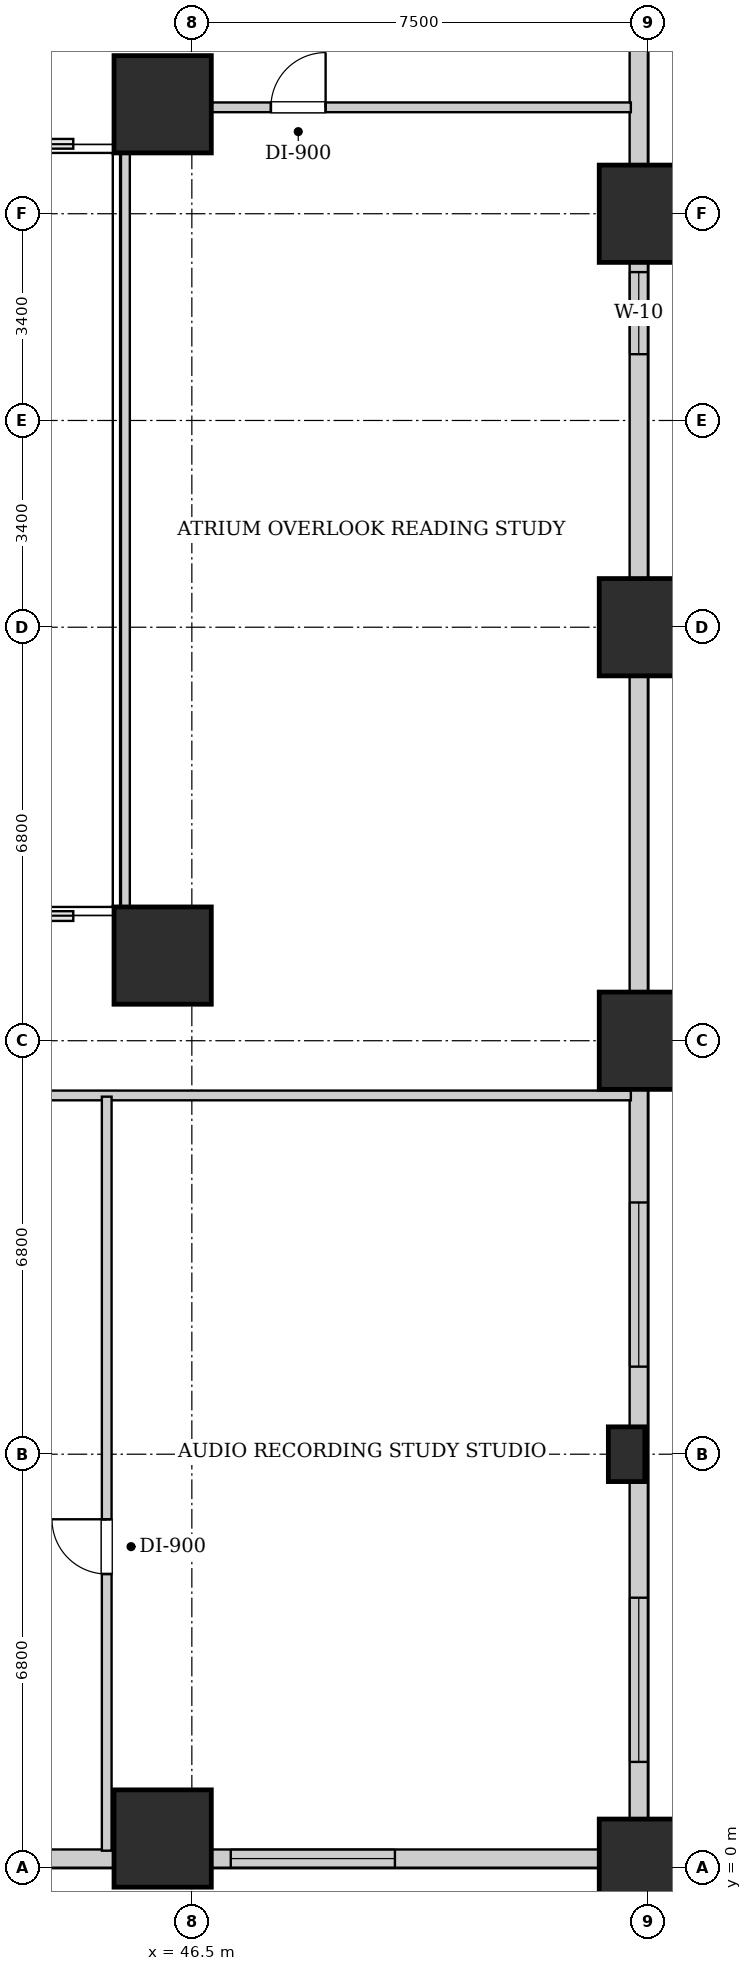
"""IFC4 building model, lengths in metres.
Left out: names, types, materials, properties, quantities, classifications, styles, units other than length and angle.
Written with IfcOpenShell. Run it as: python <this file> out.ifc"""

import sys

from ifc_helpers import new_model, si_unit, direction, frame, frame_2d, origin, origin_2d, place, context, subcontext, project, spatial, rectangle, extrude, element, fill, save


model = new_model("IFC4")
c1 = context("Model", 3, precision=1e-05, world=origin(), true_north=direction((0.0, 1.0)))
c2 = subcontext(c1, "Body", "Model", "MODEL_VIEW")
j1 = project(units=[si_unit("LENGTHUNIT", "METRE"), si_unit("PLANEANGLEUNIT", "RADIAN")], contexts=[c1])
p1 = place(None, origin())
s1 = spatial("IfcSite", under=j1, at=p1, CompositionType="ELEMENT")
p2 = place(p1, origin())
s2 = spatial("IfcBuilding", under=s1, at=p2, CompositionType="ELEMENT")
p3 = place(p2, frame((0.0, 0.0, 11.2)))
s3 = spatial("IfcBuildingStorey", under=s2, at=p3, CompositionType="ELEMENT", Elevation=11.2)
for number, where, z_axis, x_axis in (
    (1, (54.0, 0.0, 0.0), (0.0, 0.0, 1.0), (1.0, 0.0, 0.0)),
    (2, (54.0, 13.6, 0.0), (0.0, 0.0, 1.0), (1.0, 0.0, 0.0)),
    (3, (54.0, 20.4, 0.0), (0.0, 0.0, 1.0), (1.0, 0.0, 0.0)),
    (4, (54.0, 27.2, 0.0), (0.0, 0.0, 1.0), (1.0, 0.0, 0.0)),
    (5, (46.02, 0.48, 0.0), (0.0, 0.0, 1.0), (1.0, 0.0, 0.0)),
    (6, (46.02, 15.0, 0.0), (0.0, 0.0, 1.0), (1.0, 0.0, 0.0)),
    (7, (46.02, 29.0, 0.0), (0.0, 0.0, 1.0), (1.0, 0.0, 0.0)),
):
    element("IfcColumn", number, at=place(p3, frame(where, z_axis=z_axis, x_axis=x_axis)), inside=s3, PredefinedType="COLUMN", context=c2, shape_type="SweptSolid", body=[
        extrude(rectangle(XDim=1.6, YDim=1.6, at=origin_2d()), origin(), (0.0, 0.0, 1.0), 4.8),
    ])
p4 = place(p3, frame((53.65, 6.8, 0.0), z_axis=(0.0, 0.0, 1.0), x_axis=(1.0, 0.0, 0.0)))
e8 = element("IfcColumn", 8, at=p4, inside=s3, PredefinedType="PILASTER", context=c2, shape_type="SweptSolid", body=[
    extrude(rectangle(XDim=0.6, YDim=0.9, at=origin_2d()), origin(), (0.0, 0.0, 1.0), 4.8),
])
p5 = place(p3, frame((53.85, 47.44, 0.0), z_axis=(0.0, 0.0, 1.0), x_axis=(0.0, -1.0, 0.0)))
e9 = element("IfcWall", 9, at=p5, inside=s3, PredefinedType="SOLIDWALL", context=c2, shape_type="SweptSolid", body=[
    extrude(rectangle(XDim=47.28, YDim=0.3, at=frame_2d((23.64, 0.0))), origin(), (0.0, 0.0, 1.0), 3.365),
])
p6 = place(p5, frame((3.33, 0.0, 0.9)))
e10 = element("IfcOpeningElement", 10, at=p6, cuts=e9, PredefinedType="OPENING", context=c2, shape_type="SweptSolid", body=[
    extrude(rectangle(XDim=2.7, YDim=2.1, at=frame_2d((1.35, 1.05))), frame((0.0, 0.16, 0.0), z_axis=(0.0, -1.0, 0.0), x_axis=(1.0, 0.0, 0.0)), (0.0, 0.0, 1.0), 0.32),
])
p7 = place(p5, frame((9.78, 0.0, 0.9)))
e11 = element("IfcOpeningElement", 11, at=p7, cuts=e9, PredefinedType="OPENING", context=c2, shape_type="SweptSolid", body=[
    extrude(rectangle(XDim=2.7, YDim=2.1, at=frame_2d((1.35, 1.05))), frame((0.0, 0.16, 0.0), z_axis=(0.0, -1.0, 0.0), x_axis=(1.0, 0.0, 0.0)), (0.0, 0.0, 1.0), 0.32),
])
p8 = place(p5, frame((21.2, 0.0, 0.55)))
e12 = element("IfcOpeningElement", 12, at=p8, cuts=e9, PredefinedType="OPENING", context=c2, shape_type="SweptSolid", body=[
    extrude(rectangle(XDim=1.35, YDim=1.2, at=frame_2d((0.675, 0.6))), frame((0.0, 0.16, 0.0), z_axis=(0.0, -1.0, 0.0), x_axis=(1.0, 0.0, 0.0)), (0.0, 0.0, 1.0), 0.32),
])
p9 = place(p5, frame((36.5, 0.0, 0.9)))
e13 = element("IfcOpeningElement", 13, at=p9, cuts=e9, PredefinedType="OPENING", context=c2, shape_type="SweptSolid", body=[
    extrude(rectangle(XDim=2.7, YDim=2.1, at=frame_2d((1.35, 1.05))), frame((0.0, 0.16, 0.0), z_axis=(0.0, -1.0, 0.0), x_axis=(1.0, 0.0, 0.0)), (0.0, 0.0, 1.0), 0.32),
])
p10 = place(p5, frame((43.0, 0.0, 0.9)))
e14 = element("IfcOpeningElement", 14, at=p10, cuts=e9, PredefinedType="OPENING", context=c2, shape_type="SweptSolid", body=[
    extrude(rectangle(XDim=2.7, YDim=2.1, at=frame_2d((1.35, 1.05))), frame((0.0, 0.16, 0.0), z_axis=(0.0, -1.0, 0.0), x_axis=(1.0, 0.0, 0.0)), (0.0, 0.0, 1.0), 0.32),
])
p11 = place(p3, frame((53.84, 0.15, 0.0), z_axis=(0.0, 0.0, 1.0), x_axis=(-1.0, 0.0, 0.0)))
e15 = element("IfcWall", 15, at=p11, inside=s3, PredefinedType="SOLIDWALL", context=c2, shape_type="SweptSolid", body=[
    extrude(rectangle(XDim=53.68, YDim=0.3, at=frame_2d((26.84, 0.0))), origin(), (0.0, 0.0, 1.0), 3.365),
])
p12 = place(p11, frame((4.0, 0.0, 0.9)))
e16 = element("IfcOpeningElement", 16, at=p12, cuts=e15, PredefinedType="OPENING", context=c2, shape_type="SweptSolid", body=[
    extrude(rectangle(XDim=2.7, YDim=2.1, at=frame_2d((1.35, 1.05))), frame((0.0, 0.16, 0.0), z_axis=(0.0, -1.0, 0.0), x_axis=(1.0, 0.0, 0.0)), (0.0, 0.0, 1.0), 0.32),
])
p13 = place(p11, frame((10.5, 0.0, 0.9)))
e17 = element("IfcOpeningElement", 17, at=p13, cuts=e15, PredefinedType="OPENING", context=c2, shape_type="SweptSolid", body=[
    extrude(rectangle(XDim=2.7, YDim=2.1, at=frame_2d((1.35, 1.05))), frame((0.0, 0.16, 0.0), z_axis=(0.0, -1.0, 0.0), x_axis=(1.0, 0.0, 0.0)), (0.0, 0.0, 1.0), 0.32),
])
p14 = place(p11, frame((21.6, 0.0, 0.9)))
e18 = element("IfcOpeningElement", 18, at=p14, cuts=e15, PredefinedType="OPENING", context=c2, shape_type="SweptSolid", body=[
    extrude(rectangle(XDim=2.7, YDim=2.1, at=frame_2d((1.35, 1.05))), frame((0.0, 0.16, 0.0), z_axis=(0.0, -1.0, 0.0), x_axis=(1.0, 0.0, 0.0)), (0.0, 0.0, 1.0), 0.32),
])
p15 = place(p11, frame((37.0, 0.0, 0.9)))
e19 = element("IfcOpeningElement", 19, at=p15, cuts=e15, PredefinedType="OPENING", context=c2, shape_type="SweptSolid", body=[
    extrude(rectangle(XDim=2.7, YDim=2.1, at=frame_2d((1.35, 1.05))), frame((0.0, 0.16, 0.0), z_axis=(0.0, -1.0, 0.0), x_axis=(1.0, 0.0, 0.0)), (0.0, 0.0, 1.0), 0.32),
])
p16 = place(p11, frame((42.2, 0.0, 0.9)))
e20 = element("IfcOpeningElement", 20, at=p16, cuts=e15, PredefinedType="OPENING", context=c2, shape_type="SweptSolid", body=[
    extrude(rectangle(XDim=2.7, YDim=2.1, at=frame_2d((1.35, 1.05))), frame((0.0, 0.16, 0.0), z_axis=(0.0, -1.0, 0.0), x_axis=(1.0, 0.0, 0.0)), (0.0, 0.0, 1.0), 0.32),
])
p17 = place(p3, frame((5.8, 12.7, 0.0), z_axis=(0.0, 0.0, 1.0), x_axis=(1.0, 0.0, 0.0)))
e21 = element("IfcWall", 21, at=p17, inside=s3, PredefinedType="PARTITIONING", context=c2, shape_type="SweptSolid", body=[
    extrude(rectangle(XDim=47.92, YDim=0.16, at=frame_2d((23.96, 0.0))), origin(), (0.0, 0.0, 1.0), 4.48),
])
p18 = place(p17, frame((3.8, 0.0, 0.0)))
e22 = element("IfcOpeningElement", 22, at=p18, cuts=e21, PredefinedType="OPENING", context=c2, shape_type="SweptSolid", body=[
    extrude(rectangle(XDim=0.9, YDim=2.05, at=frame_2d((0.45, 1.025))), frame((0.0, 0.09, 0.0), z_axis=(0.0, -1.0, 0.0), x_axis=(1.0, 0.0, 0.0)), (0.0, 0.0, 1.0), 0.18),
])
p19 = place(p17, frame((9.32, 0.0, 0.0)))
e23 = element("IfcOpeningElement", 23, at=p19, cuts=e21, PredefinedType="OPENING", context=c2, shape_type="SweptSolid", body=[
    extrude(rectangle(XDim=0.86, YDim=2.05, at=frame_2d((0.43, 1.025))), frame((0.0, 0.09, 0.0), z_axis=(0.0, -1.0, 0.0), x_axis=(1.0, 0.0, 0.0)), (0.0, 0.0, 1.0), 0.18),
])
p20 = place(p17, frame((18.975, 0.0, 0.0)))
e24 = element("IfcOpeningElement", 24, at=p20, cuts=e21, PredefinedType="OPENING", context=c2, shape_type="SweptSolid", body=[
    extrude(rectangle(XDim=1.05, YDim=2.05, at=frame_2d((0.525, 1.025))), frame((0.0, 0.09, 0.0), z_axis=(0.0, -1.0, 0.0), x_axis=(1.0, 0.0, 0.0)), (0.0, 0.0, 1.0), 0.18),
])
p21 = place(p17, frame((35.725, 0.0, 0.0)))
e25 = element("IfcOpeningElement", 25, at=p21, cuts=e21, PredefinedType="OPENING", context=c2, shape_type="SweptSolid", body=[
    extrude(rectangle(XDim=1.05, YDim=2.05, at=frame_2d((0.525, 1.025))), frame((0.0, 0.09, 0.0), z_axis=(0.0, -1.0, 0.0), x_axis=(1.0, 0.0, 0.0)), (0.0, 0.0, 1.0), 0.18),
])
p22 = place(p3, frame((45.4, 28.95, 0.0), z_axis=(0.0, 0.0, 1.0), x_axis=(1.0, 0.0, 0.0)))
e26 = element("IfcWall", 26, at=p22, inside=s3, PredefinedType="PARTITIONING", context=c2, shape_type="SweptSolid", body=[
    extrude(rectangle(XDim=8.32, YDim=0.16, at=frame_2d((4.16, 0.0))), origin(), (0.0, 0.0, 1.0), 3.565),
])
p23 = place(p22, frame((2.4, 0.0, 0.0)))
e27 = element("IfcOpeningElement", 27, at=p23, cuts=e26, PredefinedType="OPENING", context=c2, shape_type="SweptSolid", body=[
    extrude(rectangle(XDim=0.9, YDim=2.05, at=frame_2d((0.45, 1.025))), frame((0.0, 0.09, 0.0), z_axis=(0.0, -1.0, 0.0), x_axis=(1.0, 0.0, 0.0)), (0.0, 0.0, 1.0), 0.18),
])
p24 = place(p3, frame((45.4, 15.1, 0.0), z_axis=(0.0, 0.0, 1.0), x_axis=(0.0, 1.0, 0.0)))
e28 = element("IfcWall", 28, at=p24, inside=s3, PredefinedType="PARTITIONING", context=c2, shape_type="SweptSolid", body=[
    extrude(rectangle(XDim=13.78, YDim=0.16, at=frame_2d((6.89, 0.0))), origin(), (0.0, 0.0, 1.0), 4.48),
])
p25 = place(p3, frame((45.1, 0.28, 0.0), z_axis=(0.0, 0.0, 1.0), x_axis=(0.0, 1.0, 0.0)))
e29 = element("IfcWall", 29, at=p25, inside=s3, PredefinedType="PARTITIONING", context=c2, shape_type="SweptSolid", body=[
    extrude(rectangle(XDim=12.4, YDim=0.16, at=frame_2d((6.2, 0.0))), origin(), (0.0, 0.0, 1.0), 4.48),
])
p26 = place(p25, frame((4.55, 0.0, 0.0)))
e30 = element("IfcOpeningElement", 30, at=p26, cuts=e29, PredefinedType="OPENING", context=c2, shape_type="SweptSolid", body=[
    extrude(rectangle(XDim=0.9, YDim=2.05, at=frame_2d((0.45, 1.025))), frame((0.0, 0.09, 0.0), z_axis=(0.0, -1.0, 0.0), x_axis=(1.0, 0.0, 0.0)), (0.0, 0.0, 1.0), 0.18),
])
p27 = place(p23, origin())
e31 = element("IfcDoor", 31, at=p27, inside=s3, OperationType="SINGLE_SWING_RIGHT", PredefinedType="DOOR", context=c2, shape_type="SweptSolid", body=[
    extrude(rectangle(XDim=0.9, YDim=2.05, at=frame_2d((0.45, 1.025))), frame((0.0, 0.025, 0.0), z_axis=(0.0, -1.0, 0.0), x_axis=(1.0, 0.0, 0.0)), (0.0, 0.0, 1.0), 0.05),
])
fill(e27, e31)
p28 = place(p26, origin())
e32 = element("IfcDoor", 32, at=p28, inside=s3, OperationType="SINGLE_SWING_RIGHT", PredefinedType="DOOR", context=c2, shape_type="SweptSolid", body=[
    extrude(rectangle(XDim=0.9, YDim=2.05, at=frame_2d((0.45, 1.025))), frame((0.0, 0.025, 0.0), z_axis=(0.0, -1.0, 0.0), x_axis=(1.0, 0.0, 0.0)), (0.0, 0.0, 1.0), 0.05),
])
fill(e30, e32)
p29 = place(p8, origin())
e33 = element("IfcWindow", 33, at=p29, inside=s3, PartitioningType="SINGLE_PANEL", PredefinedType="WINDOW", context=c2, shape_type="SweptSolid", body=[
    extrude(rectangle(XDim=1.35, YDim=1.2, at=frame_2d((0.675, 0.6))), frame((0.0, 0.03, 0.0), z_axis=(0.0, -1.0, 0.0), x_axis=(1.0, 0.0, 0.0)), (0.0, 0.0, 1.0), 0.06),
])
fill(e12, e33)
p30 = place(p9, origin())
e34 = element("IfcWindow", 34, at=p30, inside=s3, PartitioningType="TRIPLE_PANEL_VERTICAL", PredefinedType="WINDOW", context=c2, shape_type="SweptSolid", body=[
    extrude(rectangle(XDim=2.7, YDim=2.1, at=frame_2d((1.35, 1.05))), frame((0.0, 0.03, 0.0), z_axis=(0.0, -1.0, 0.0), x_axis=(1.0, 0.0, 0.0)), (0.0, 0.0, 1.0), 0.06),
])
fill(e13, e34)
p31 = place(p10, origin())
e35 = element("IfcWindow", 35, at=p31, inside=s3, PartitioningType="TRIPLE_PANEL_VERTICAL", PredefinedType="WINDOW", context=c2, shape_type="SweptSolid", body=[
    extrude(rectangle(XDim=2.7, YDim=2.1, at=frame_2d((1.35, 1.05))), frame((0.0, 0.03, 0.0), z_axis=(0.0, -1.0, 0.0), x_axis=(1.0, 0.0, 0.0)), (0.0, 0.0, 1.0), 0.06),
])
fill(e14, e35)
p32 = place(p12, origin())
e36 = element("IfcWindow", 36, at=p32, inside=s3, PartitioningType="TRIPLE_PANEL_VERTICAL", PredefinedType="WINDOW", context=c2, shape_type="SweptSolid", body=[
    extrude(rectangle(XDim=2.7, YDim=2.1, at=frame_2d((1.35, 1.05))), frame((0.0, 0.03, 0.0), z_axis=(0.0, -1.0, 0.0), x_axis=(1.0, 0.0, 0.0)), (0.0, 0.0, 1.0), 0.06),
])
fill(e16, e36)
save(model, sys.argv[1])
